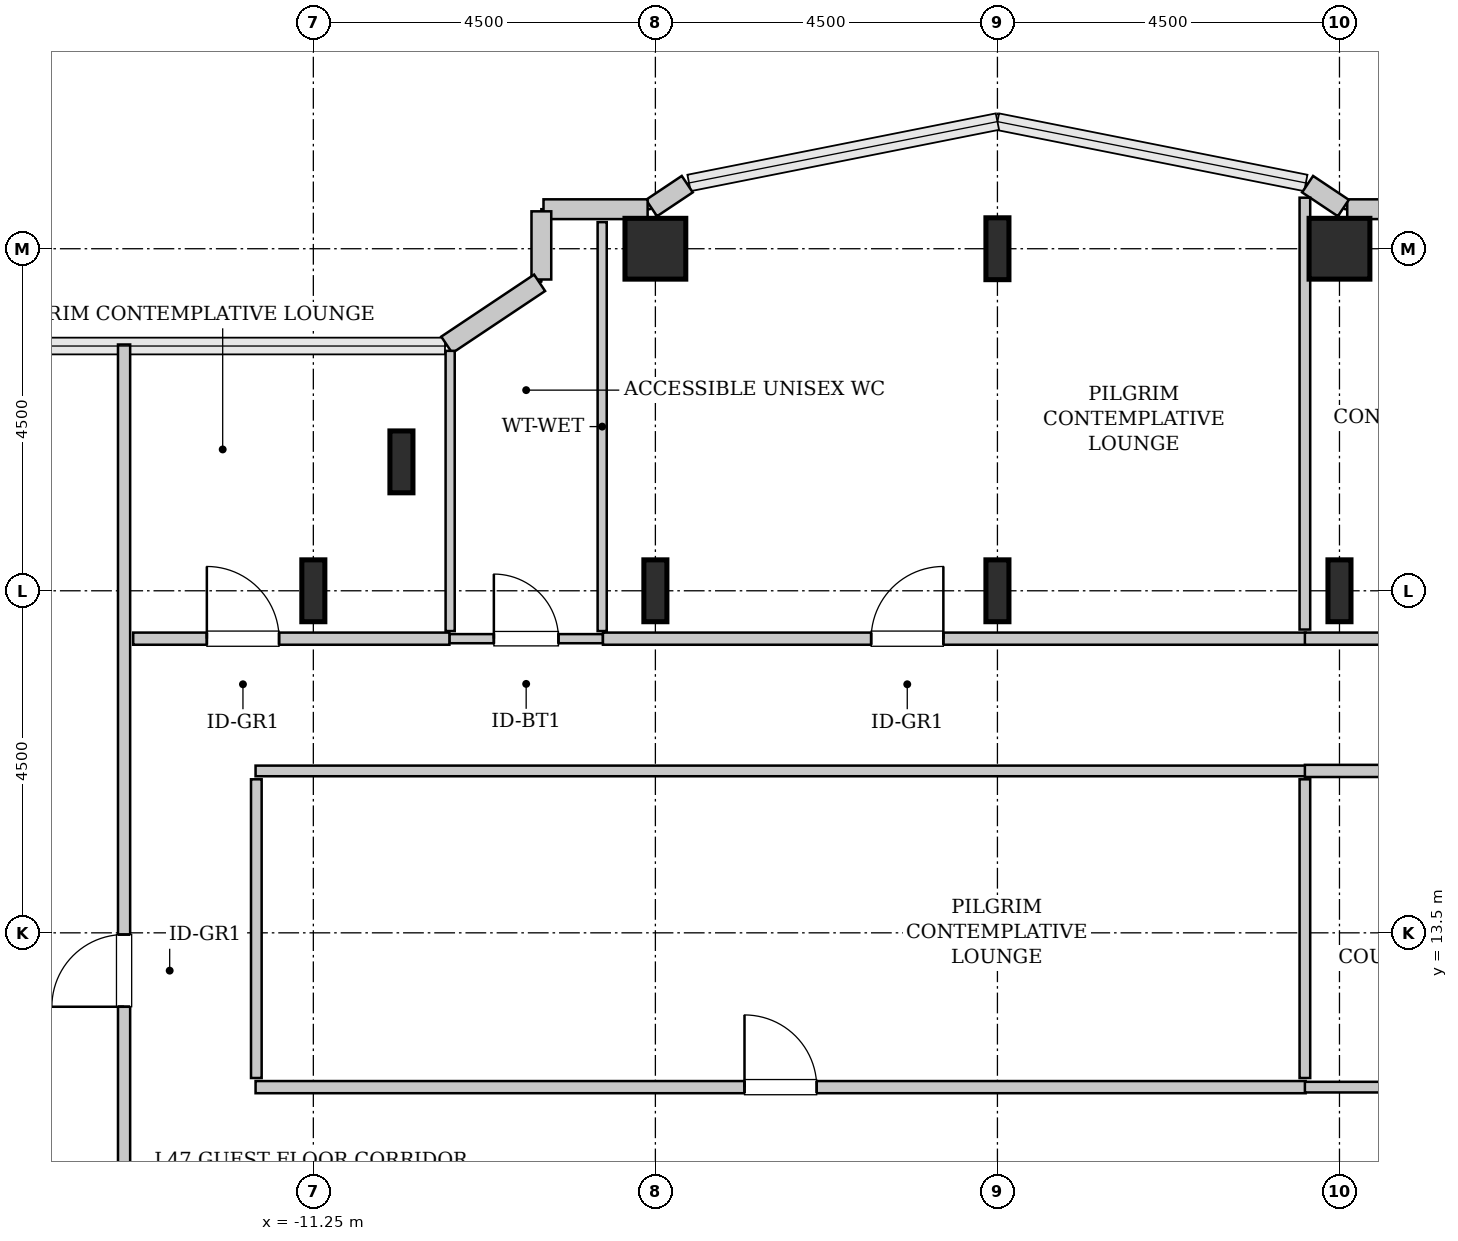
"""IFC4 building model, lengths in metres.
Left out: names, types, materials, properties, quantities, classifications, styles, units other than length and angle.
Written with IfcOpenShell. Run it as: python <this file> out.ifc"""

import sys

from ifc_helpers import new_model, si_unit, direction, frame, frame_2d, origin, origin_2d, place, context, subcontext, project, spatial, rectangle, hollow_rectangle, i_section, extrude, source, transform, mapped, element, fill, save


model = new_model("IFC4")
c1 = context("Model", 3, precision=1e-05, world=origin(), true_north=direction((0.0, 1.0)))
c2 = subcontext(c1, "Body", "Model", "MODEL_VIEW")
j1 = project(units=[si_unit("LENGTHUNIT", "METRE"), si_unit("PLANEANGLEUNIT", "RADIAN")], contexts=[c1])
p1 = place(None, origin())
s1 = spatial("IfcSite", under=j1, at=p1, CompositionType="ELEMENT")
p2 = place(p1, origin())
s2 = spatial("IfcBuilding", under=s1, at=p2, CompositionType="ELEMENT")
p3 = place(p2, frame((0.0, 0.0, 190.6)))
s3 = spatial("IfcBuildingStorey", under=s2, at=p3, CompositionType="ELEMENT", Elevation=190.6)
m1 = source(origin(), c2, "Body", "SweptSolid", [
    extrude(i_section(OverallWidth=0.303, OverallDepth=0.814, WebThickness=0.021, FlangeThickness=0.04, FilletRadius=0.03, at=origin_2d()), origin(), (0.0, 0.0, 1.0), 3.8),
])
for number, where, z_axis, x_axis in (
    (1, (-11.25, 18.0, 0.0), (0.0, 0.0, 1.0), (1.0, 0.0, 0.0)),
    (2, (-10.091, 19.696, 0.0), (0.0, 0.0, 1.0), (1.0, 0.0, 0.0)),
    (3, (-6.75, 18.0, 0.0), (0.0, 0.0, 1.0), (1.0, 0.0, 0.0)),
):
    element("IfcColumn", number, at=place(p3, frame(where, z_axis=z_axis, x_axis=x_axis)), inside=s3, PredefinedType="COLUMN", context=c2, shape_type="MappedRepresentation", body=[
        mapped(m1, transform((0.0, 0.0, 0.0), x_axis=(1.0, 0.0, 0.0), y_axis=(0.0, 1.0, 0.0), z_axis=(0.0, 0.0, 1.0), scale=1.0)),
    ])
m2 = source(origin(), c2, "Body", "SweptSolid", [
    extrude(hollow_rectangle(XDim=0.8, YDim=0.8, WallThickness=0.04, InnerFilletRadius=0.04, OuterFilletRadius=0.08, at=origin_2d()), origin(), (0.0, 0.0, 1.0), 3.8),
])
p4 = place(p3, frame((-6.75, 22.5, 0.0), z_axis=(0.0, 0.0, 1.0), x_axis=(1.0, 0.0, 0.0)))
e4 = element("IfcColumn", 4, at=p4, inside=s3, PredefinedType="COLUMN", context=c2, shape_type="MappedRepresentation", body=[
    mapped(m2, transform((0.0, 0.0, 0.0), x_axis=(1.0, 0.0, 0.0), y_axis=(0.0, 1.0, 0.0), z_axis=(0.0, 0.0, 1.0), scale=1.0)),
])
for number, where, z_axis, x_axis in (
    (5, (-2.25, 18.0, 0.0), (0.0, 0.0, 1.0), (1.0, 0.0, 0.0)),
    (6, (-2.25, 22.5, 0.0), (0.0, 0.0, 1.0), (1.0, 0.0, 0.0)),
    (7, (2.25, 18.0, 0.0), (0.0, 0.0, 1.0), (1.0, 0.0, 0.0)),
):
    element("IfcColumn", number, at=place(p3, frame(where, z_axis=z_axis, x_axis=x_axis)), inside=s3, PredefinedType="COLUMN", context=c2, shape_type="MappedRepresentation", body=[
        mapped(m1, transform((0.0, 0.0, 0.0), x_axis=(1.0, 0.0, 0.0), y_axis=(0.0, 1.0, 0.0), z_axis=(0.0, 0.0, 1.0), scale=1.0)),
    ])
p5 = place(p3, frame((2.25, 22.5, 0.0), z_axis=(0.0, 0.0, 1.0), x_axis=(1.0, 0.0, 0.0)))
e8 = element("IfcColumn", 8, at=p5, inside=s3, PredefinedType="COLUMN", context=c2, shape_type="MappedRepresentation", body=[
    mapped(m2, transform((0.0, 0.0, 0.0), x_axis=(1.0, 0.0, 0.0), y_axis=(0.0, 1.0, 0.0), z_axis=(0.0, 0.0, 1.0), scale=1.0)),
])
m3 = source(origin(), c2, "Body", "SweptSolid", [
    extrude(rectangle(XDim=1.37, YDim=0.26, at=frame_2d((0.685, 0.0))), origin(), (0.0, 0.0, 1.0), 3.55),
])
p6 = place(p3, frame((3.722, 23.02, 0.0), z_axis=(0.0, 0.0, 1.0), x_axis=(-1.0, 0.0, 0.0)))
e9 = element("IfcWall", 9, at=p6, inside=s3, PredefinedType="SOLIDWALL", context=c2, shape_type="MappedRepresentation", body=[
    mapped(m3, transform((0.0, 0.0, 0.0), x_axis=(1.0, 0.0, 0.0), y_axis=(0.0, 1.0, 0.0), z_axis=(0.0, 0.0, 1.0), scale=1.0)),
])
m4 = source(origin(), c2, "Body", "SweptSolid", [
    extrude(rectangle(XDim=0.565, YDim=0.26, at=frame_2d((0.283, 0.0))), origin(), (0.0, 0.0, 1.0), 3.55),
])
for number, where, z_axis, x_axis in (
    (10, (2.301, 23.036, 0.0), (0.0, 0.0, 1.0), (-0.832, 0.555, 0.0)),
    (11, (-6.331, 23.35, 0.0), (0.0, 0.0, 1.0), (-0.832, -0.555, 0.0)),
):
    element("IfcWall", number, at=place(p3, frame(where, z_axis=z_axis, x_axis=x_axis)), inside=s3, PredefinedType="SOLIDWALL", context=c2, shape_type="MappedRepresentation", body=[
        mapped(m4, transform((0.0, 0.0, 0.0), x_axis=(1.0, 0.0, 0.0), y_axis=(0.0, 1.0, 0.0), z_axis=(0.0, 0.0, 1.0), scale=1.0)),
    ])
p7 = place(p3, frame((-6.852, 23.02, 0.0), z_axis=(0.0, 0.0, 1.0), x_axis=(-1.0, 0.0, 0.0)))
e12 = element("IfcWall", 12, at=p7, inside=s3, PredefinedType="SOLIDWALL", context=c2, shape_type="MappedRepresentation", body=[
    mapped(m3, transform((0.0, 0.0, 0.0), x_axis=(1.0, 0.0, 0.0), y_axis=(0.0, 1.0, 0.0), z_axis=(0.0, 0.0, 1.0), scale=1.0)),
])
m5 = source(origin(), c2, "Body", "SweptSolid", [
    extrude(rectangle(XDim=0.897, YDim=0.26, at=frame_2d((0.448, 0.0))), origin(), (0.0, 0.0, 1.0), 3.55),
])
p8 = place(p3, frame((-8.25, 22.992, 0.0), z_axis=(0.0, 0.0, 1.0), x_axis=(0.0, -1.0, 0.0)))
e13 = element("IfcWall", 13, at=p8, inside=s3, PredefinedType="SOLIDWALL", context=c2, shape_type="MappedRepresentation", body=[
    mapped(m5, transform((0.0, 0.0, 0.0), x_axis=(1.0, 0.0, 0.0), y_axis=(0.0, 1.0, 0.0), z_axis=(0.0, 0.0, 1.0), scale=1.0)),
])
m6 = source(origin(), c2, "Body", "SweptSolid", [
    extrude(rectangle(XDim=1.469, YDim=0.26, at=frame_2d((0.734, 0.0))), origin(), (0.0, 0.0, 1.0), 3.55),
])
p9 = place(p3, frame((-8.273, 22.052, 0.0), z_axis=(0.0, 0.0, 1.0), x_axis=(-0.831461760506, -0.555581983884, 0.0)))
e14 = element("IfcWall", 14, at=p9, inside=s3, PredefinedType="SOLIDWALL", context=c2, shape_type="MappedRepresentation", body=[
    mapped(m6, transform((0.0, 0.0, 0.0), x_axis=(1.0, 0.0, 0.0), y_axis=(0.0, 1.0, 0.0), z_axis=(0.0, 0.0, 1.0), scale=1.0)),
])
m7 = source(origin(), c2, "Body", "SweptSolid", [
    extrude(rectangle(XDim=2.02, YDim=0.12, at=frame_2d((1.01, 0.0))), origin(), (0.0, 0.0, 1.0), 3.535),
])
p10 = place(p3, frame((-9.46, 17.37, 0.0), z_axis=(0.0, 0.0, 1.0), x_axis=(1.0, 0.0, 0.0)))
e15 = element("IfcWall", 15, at=p10, inside=s3, PredefinedType="PLUMBINGWALL", context=c2, shape_type="MappedRepresentation", body=[
    mapped(m7, transform((0.0, 0.0, 0.0), x_axis=(1.0, 0.0, 0.0), y_axis=(0.0, 1.0, 0.0), z_axis=(0.0, 0.0, 1.0), scale=1.0)),
])
p11 = place(p10, frame((0.585, 0.0, 0.0)))
e16 = element("IfcOpeningElement", 16, at=p11, cuts=e15, PredefinedType="OPENING", context=c2, shape_type="SweptSolid", body=[
    extrude(rectangle(XDim=0.85, YDim=2.1, at=frame_2d((0.425, 1.05))), frame((0.0, 0.07, 0.0), z_axis=(0.0, -1.0, 0.0), x_axis=(1.0, 0.0, 0.0)), (0.0, 0.0, 1.0), 0.14),
])
m8 = source(origin(), c2, "Body", "SweptSolid", [
    extrude(rectangle(XDim=5.38, YDim=0.12, at=frame_2d((2.69, 0.0))), origin(), (0.0, 0.0, 1.0), 3.535),
])
p12 = place(p3, frame((-7.45, 17.47, 0.0), z_axis=(0.0, 0.0, 1.0), x_axis=(0.0, 1.0, 0.0)))
e17 = element("IfcWall", 17, at=p12, inside=s3, PredefinedType="PLUMBINGWALL", context=c2, shape_type="MappedRepresentation", body=[
    mapped(m8, transform((0.0, 0.0, 0.0), x_axis=(1.0, 0.0, 0.0), y_axis=(0.0, 1.0, 0.0), z_axis=(0.0, 0.0, 1.0), scale=1.0)),
])
m9 = source(origin(), c2, "Body", "SweptSolid", [
    extrude(rectangle(XDim=3.687, YDim=0.12, at=frame_2d((1.843, 0.0))), origin(), (0.0, 0.0, 1.0), 3.535),
])
p13 = place(p3, frame((-9.45, 17.47, 0.0), z_axis=(0.0, 0.0, 1.0), x_axis=(0.0, 1.0, 0.0)))
e18 = element("IfcWall", 18, at=p13, inside=s3, PredefinedType="PLUMBINGWALL", context=c2, shape_type="MappedRepresentation", body=[
    mapped(m9, transform((0.0, 0.0, 0.0), x_axis=(1.0, 0.0, 0.0), y_axis=(0.0, 1.0, 0.0), z_axis=(0.0, 0.0, 1.0), scale=1.0)),
])
m10 = source(origin(), c2, "Body", "SweptSolid", [
    extrude(rectangle(XDim=12.645, YDim=0.16, at=frame_2d((6.323, 0.0))), origin(), (0.0, 0.0, 1.0), 3.535),
])
p14 = place(p3, frame((-13.74, 8.595, 0.0), z_axis=(0.0, 0.0, 1.0), x_axis=(0.0, 1.0, 0.0)))
e19 = element("IfcWall", 19, at=p14, inside=s3, PredefinedType="PARTITIONING", context=c2, shape_type="MappedRepresentation", body=[
    mapped(m10, transform((0.0, 0.0, 0.0), x_axis=(1.0, 0.0, 0.0), y_axis=(0.0, 1.0, 0.0), z_axis=(0.0, 0.0, 1.0), scale=1.0)),
])
p15 = place(p14, frame((3.933, 0.0, 0.0)))
e20 = element("IfcOpeningElement", 20, at=p15, cuts=e19, PredefinedType="OPENING", context=c2, shape_type="SweptSolid", body=[
    extrude(rectangle(XDim=0.95, YDim=2.1, at=frame_2d((0.475, 1.05))), frame((0.0, 0.09, 0.0), z_axis=(0.0, -1.0, 0.0), x_axis=(1.0, 0.0, 0.0)), (0.0, 0.0, 1.0), 0.18),
])
m11 = source(origin(), c2, "Body", "SweptSolid", [
    extrude(rectangle(XDim=13.815, YDim=0.16, at=frame_2d((6.907, 0.0))), origin(), (0.0, 0.0, 1.0), 3.535),
])
p16 = place(p3, frame((-12.01, 11.47, 0.0), z_axis=(0.0, 0.0, 1.0), x_axis=(1.0, 0.0, 0.0)))
e21 = element("IfcWall", 21, at=p16, inside=s3, PredefinedType="PARTITIONING", context=c2, shape_type="MappedRepresentation", body=[
    mapped(m11, transform((0.0, 0.0, 0.0), x_axis=(1.0, 0.0, 0.0), y_axis=(0.0, 1.0, 0.0), z_axis=(0.0, 0.0, 1.0), scale=1.0)),
])
p17 = place(p16, frame((6.433, 0.0, 0.0)))
e22 = element("IfcOpeningElement", 22, at=p17, cuts=e21, PredefinedType="OPENING", context=c2, shape_type="SweptSolid", body=[
    extrude(rectangle(XDim=0.95, YDim=2.1, at=frame_2d((0.475, 1.05))), frame((0.0, 0.09, 0.0), z_axis=(0.0, -1.0, 0.0), x_axis=(1.0, 0.0, 0.0)), (0.0, 0.0, 1.0), 0.18),
])
m12 = source(origin(), c2, "Body", "SweptSolid", [
    extrude(rectangle(XDim=13.815, YDim=0.14, at=frame_2d((6.907, 0.0))), origin(), (0.0, 0.0, 1.0), 3.535),
])
p18 = place(p3, frame((-12.01, 15.63, 0.0), z_axis=(0.0, 0.0, 1.0), x_axis=(1.0, 0.0, 0.0)))
e23 = element("IfcWall", 23, at=p18, inside=s3, PredefinedType="PARTITIONING", context=c2, shape_type="MappedRepresentation", body=[
    mapped(m12, transform((0.0, 0.0, 0.0), x_axis=(1.0, 0.0, 0.0), y_axis=(0.0, 1.0, 0.0), z_axis=(0.0, 0.0, 1.0), scale=1.0)),
])
m13 = source(origin(), c2, "Body", "SweptSolid", [
    extrude(rectangle(XDim=3.93, YDim=0.14, at=frame_2d((1.965, 0.0))), origin(), (0.0, 0.0, 1.0), 3.535),
])
for number, where, z_axis, x_axis in (
    (24, (-12.0, 11.59, 0.0), (0.0, 0.0, 1.0), (0.0, 1.0, 0.0)),
    (25, (1.795, 11.59, 0.0), (0.0, 0.0, 1.0), (0.0, 1.0, 0.0)),
):
    element("IfcWall", number, at=place(p3, frame(where, z_axis=z_axis, x_axis=x_axis)), inside=s3, PredefinedType="PARTITIONING", context=c2, shape_type="MappedRepresentation", body=[
        mapped(m13, transform((0.0, 0.0, 0.0), x_axis=(1.0, 0.0, 0.0), y_axis=(0.0, 1.0, 0.0), z_axis=(0.0, 0.0, 1.0), scale=1.0)),
    ])
m14 = source(origin(), c2, "Body", "SweptSolid", [
    extrude(rectangle(XDim=9.245, YDim=0.16, at=frame_2d((4.623, 0.0))), origin(), (0.0, 0.0, 1.0), 3.535),
])
p19 = place(p3, frame((-7.44, 17.37, 0.0), z_axis=(0.0, 0.0, 1.0), x_axis=(1.0, 0.0, 0.0)))
e26 = element("IfcWall", 26, at=p19, inside=s3, PredefinedType="PARTITIONING", context=c2, shape_type="MappedRepresentation", body=[
    mapped(m14, transform((0.0, 0.0, 0.0), x_axis=(1.0, 0.0, 0.0), y_axis=(0.0, 1.0, 0.0), z_axis=(0.0, 0.0, 1.0), scale=1.0)),
])
p20 = place(p19, frame((3.529, 0.0, 0.0)))
e27 = element("IfcOpeningElement", 27, at=p20, cuts=e26, PredefinedType="OPENING", context=c2, shape_type="SweptSolid", body=[
    extrude(rectangle(XDim=0.95, YDim=2.1, at=frame_2d((0.475, 1.05))), frame((0.0, 0.09, 0.0), z_axis=(0.0, -1.0, 0.0), x_axis=(1.0, 0.0, 0.0)), (0.0, 0.0, 1.0), 0.18),
])
m15 = source(origin(), c2, "Body", "SweptSolid", [
    extrude(rectangle(XDim=5.681, YDim=0.14, at=frame_2d((2.841, 0.0))), origin(), (0.0, 0.0, 1.0), 2.875),
])
p21 = place(p3, frame((1.795, 17.49, 0.0), z_axis=(0.0, 0.0, 1.0), x_axis=(0.0, 1.0, 0.0)))
e28 = element("IfcWall", 28, at=p21, inside=s3, PredefinedType="PARTITIONING", context=c2, shape_type="MappedRepresentation", body=[
    mapped(m15, transform((0.0, 0.0, 0.0), x_axis=(1.0, 0.0, 0.0), y_axis=(0.0, 1.0, 0.0), z_axis=(0.0, 0.0, 1.0), scale=1.0)),
])
m16 = source(origin(), c2, "Body", "SweptSolid", [
    extrude(rectangle(XDim=4.16, YDim=0.16, at=frame_2d((2.08, 0.0))), origin(), (0.0, 0.0, 1.0), 3.535),
])
p22 = place(p3, frame((-13.62, 17.37, 0.0), z_axis=(0.0, 0.0, 1.0), x_axis=(1.0, 0.0, 0.0)))
e29 = element("IfcWall", 29, at=p22, inside=s3, PredefinedType="PARTITIONING", context=c2, shape_type="MappedRepresentation", body=[
    mapped(m16, transform((0.0, 0.0, 0.0), x_axis=(1.0, 0.0, 0.0), y_axis=(0.0, 1.0, 0.0), z_axis=(0.0, 0.0, 1.0), scale=1.0)),
])
p23 = place(p22, frame((0.969, 0.0, 0.0)))
e30 = element("IfcOpeningElement", 30, at=p23, cuts=e29, PredefinedType="OPENING", context=c2, shape_type="SweptSolid", body=[
    extrude(rectangle(XDim=0.95, YDim=2.1, at=frame_2d((0.475, 1.05))), frame((0.0, 0.09, 0.0), z_axis=(0.0, -1.0, 0.0), x_axis=(1.0, 0.0, 0.0)), (0.0, 0.0, 1.0), 0.18),
])
m17 = source(origin(), c2, "Body", "SweptSolid", [
    extrude(rectangle(XDim=6.61, YDim=0.16, at=frame_2d((3.305, 0.0))), origin(), (0.0, 0.0, 1.0), 3.535),
])
p24 = place(p3, frame((1.795, 17.37, 0.0), z_axis=(0.0, 0.0, 1.0), x_axis=(1.0, 0.0, 0.0)))
e31 = element("IfcWall", 31, at=p24, inside=s3, PredefinedType="PARTITIONING", context=c2, shape_type="MappedRepresentation", body=[
    mapped(m17, transform((0.0, 0.0, 0.0), x_axis=(1.0, 0.0, 0.0), y_axis=(0.0, 1.0, 0.0), z_axis=(0.0, 0.0, 1.0), scale=1.0)),
])
p25 = place(p24, frame((2.83, 0.0, 0.0)))
e32 = element("IfcOpeningElement", 32, at=p25, cuts=e31, PredefinedType="OPENING", context=c2, shape_type="SweptSolid", body=[
    extrude(rectangle(XDim=0.95, YDim=2.1, at=frame_2d((0.475, 1.05))), frame((0.0, 0.09, 0.0), z_axis=(0.0, -1.0, 0.0), x_axis=(1.0, 0.0, 0.0)), (0.0, 0.0, 1.0), 0.18),
])
p26 = place(p3, frame((1.795, 15.63, 0.0), z_axis=(0.0, 0.0, 1.0), x_axis=(1.0, 0.0, 0.0)))
e33 = element("IfcWall", 33, at=p26, inside=s3, PredefinedType="PARTITIONING", context=c2, shape_type="MappedRepresentation", body=[
    mapped(m17, transform((0.0, 0.0, 0.0), x_axis=(1.0, 0.0, 0.0), y_axis=(0.0, 1.0, 0.0), z_axis=(0.0, 0.0, 1.0), scale=1.0)),
])
p27 = place(p26, frame((2.83, 0.0, 0.0)))
e34 = element("IfcOpeningElement", 34, at=p27, cuts=e33, PredefinedType="OPENING", context=c2, shape_type="SweptSolid", body=[
    extrude(rectangle(XDim=0.95, YDim=2.1, at=frame_2d((0.475, 1.05))), frame((0.0, 0.09, 0.0), z_axis=(0.0, -1.0, 0.0), x_axis=(1.0, 0.0, 0.0)), (0.0, 0.0, 1.0), 0.18),
])
m18 = source(origin(), c2, "Body", "SweptSolid", [
    extrude(rectangle(XDim=6.61, YDim=0.14, at=frame_2d((3.305, 0.0))), origin(), (0.0, 0.0, 1.0), 3.535),
])
p28 = place(p3, frame((1.795, 11.47, 0.0), z_axis=(0.0, 0.0, 1.0), x_axis=(1.0, 0.0, 0.0)))
e35 = element("IfcWall", 35, at=p28, inside=s3, PredefinedType="PARTITIONING", context=c2, shape_type="MappedRepresentation", body=[
    mapped(m18, transform((0.0, 0.0, 0.0), x_axis=(1.0, 0.0, 0.0), y_axis=(0.0, 1.0, 0.0), z_axis=(0.0, 0.0, 1.0), scale=1.0)),
])
m19 = source(origin(), c2, "Body", "SweptSolid", [
    extrude(rectangle(XDim=0.85, YDim=2.1, at=frame_2d((0.425, 1.05))), frame((0.0, 0.025, 0.0), z_axis=(0.0, -1.0, 0.0), x_axis=(1.0, 0.0, 0.0)), (0.0, 0.0, 1.0), 0.05),
])
p29 = place(p11, origin())
e36 = element("IfcDoor", 36, at=p29, inside=s3, OperationType="SINGLE_SWING_LEFT", PredefinedType="DOOR", context=c2, shape_type="MappedRepresentation", body=[
    mapped(m19, transform((0.0, 0.0, 0.0), x_axis=(1.0, 0.0, 0.0), y_axis=(0.0, 1.0, 0.0), z_axis=(0.0, 0.0, 1.0), scale=1.0)),
])
fill(e16, e36)
m20 = source(origin(), c2, "Body", "SweptSolid", [
    extrude(rectangle(XDim=0.95, YDim=2.1, at=frame_2d((0.475, 1.05))), frame((0.0, 0.025, 0.0), z_axis=(0.0, -1.0, 0.0), x_axis=(1.0, 0.0, 0.0)), (0.0, 0.0, 1.0), 0.05),
])
p30 = place(p15, origin())
e37 = element("IfcDoor", 37, at=p30, inside=s3, OperationType="SINGLE_SWING_LEFT", PredefinedType="DOOR", context=c2, shape_type="MappedRepresentation", body=[
    mapped(m20, transform((0.0, 0.0, 0.0), x_axis=(1.0, 0.0, 0.0), y_axis=(0.0, 1.0, 0.0), z_axis=(0.0, 0.0, 1.0), scale=1.0)),
])
fill(e20, e37)
p31 = place(p17, origin())
e38 = element("IfcDoor", 38, at=p31, inside=s3, OperationType="SINGLE_SWING_LEFT", PredefinedType="DOOR", context=c2, shape_type="MappedRepresentation", body=[
    mapped(m20, transform((0.0, 0.0, 0.0), x_axis=(1.0, 0.0, 0.0), y_axis=(0.0, 1.0, 0.0), z_axis=(0.0, 0.0, 1.0), scale=1.0)),
])
fill(e22, e38)
p32 = place(p20, origin())
e39 = element("IfcDoor", 39, at=p32, inside=s3, OperationType="SINGLE_SWING_RIGHT", PredefinedType="DOOR", context=c2, shape_type="MappedRepresentation", body=[
    mapped(m20, transform((0.0, 0.0, 0.0), x_axis=(1.0, 0.0, 0.0), y_axis=(0.0, 1.0, 0.0), z_axis=(0.0, 0.0, 1.0), scale=1.0)),
])
fill(e27, e39)
p33 = place(p23, origin())
e40 = element("IfcDoor", 40, at=p33, inside=s3, OperationType="SINGLE_SWING_LEFT", PredefinedType="DOOR", context=c2, shape_type="MappedRepresentation", body=[
    mapped(m20, transform((0.0, 0.0, 0.0), x_axis=(1.0, 0.0, 0.0), y_axis=(0.0, 1.0, 0.0), z_axis=(0.0, 0.0, 1.0), scale=1.0)),
])
fill(e30, e40)
save(model, sys.argv[1])
